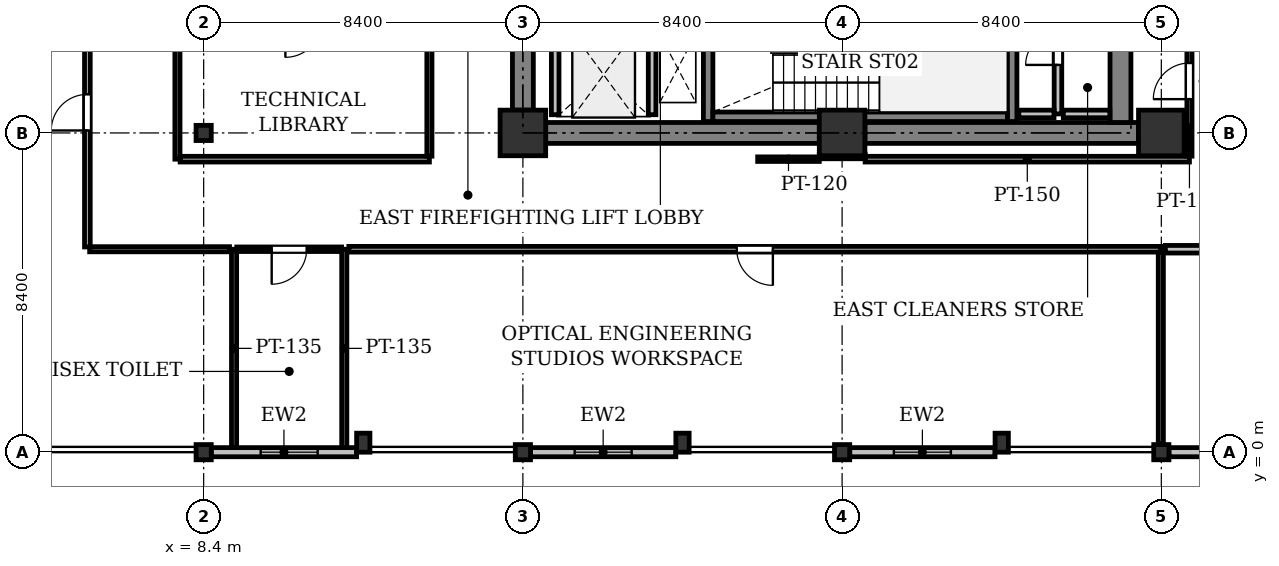
"""IFC4 building model, lengths in metres.
Left out: names, types, materials, properties, quantities, classifications, styles, units other than length and angle.
Written with IfcOpenShell. Run it as: python <this file> out.ifc"""

import sys

from ifc_helpers import new_model, si_unit, direction, frame, frame_2d, origin, origin_2d, place, context, subcontext, project, spatial, rectangle, i_section, extrude, element, fill, save


model = new_model("IFC4")
c1 = context("Model", 3, precision=1e-05, world=origin(), true_north=direction((0.0, 1.0)))
c2 = subcontext(c1, "Body", "Model", "MODEL_VIEW")
j1 = project(units=[si_unit("LENGTHUNIT", "METRE"), si_unit("PLANEANGLEUNIT", "RADIAN")], contexts=[c1])
p1 = place(None, origin())
s1 = spatial("IfcSite", under=j1, at=p1, CompositionType="ELEMENT")
p2 = place(p1, origin())
s2 = spatial("IfcBuilding", under=s1, at=p2, CompositionType="ELEMENT")
p3 = place(p2, frame((0.0, 0.0, 96.7)))
s3 = spatial("IfcBuildingStorey", under=s2, at=p3, CompositionType="ELEMENT", Elevation=96.7)
for number, where, z_axis, x_axis in (
    (1, (8.4, 0.0, 0.0), (0.0, 0.0, 1.0), (1.0, 0.0, 0.0)),
    (2, (8.4, 8.4, 0.0), (0.0, 0.0, 1.0), (1.0, 0.0, 0.0)),
    (3, (16.8, 0.0, 0.0), (0.0, 0.0, 1.0), (1.0, 0.0, 0.0)),
):
    element("IfcColumn", number, at=place(p3, frame(where, z_axis=z_axis, x_axis=x_axis)), inside=s3, PredefinedType="COLUMN", context=c2, shape_type="SweptSolid", body=[
        extrude(i_section(OverallWidth=0.4, OverallDepth=0.4, WebThickness=0.025, FlangeThickness=0.04, at=origin_2d()), origin(), (0.0, 0.0, 1.0), 4.1),
    ])
p4 = place(p3, frame((16.8, 8.4, 0.0), z_axis=(0.0, 0.0, 1.0), x_axis=(1.0, 0.0, 0.0)))
e4 = element("IfcColumn", 4, at=p4, inside=s3, PredefinedType="COLUMN", context=c2, shape_type="SweptSolid", body=[
    extrude(rectangle(XDim=1.2, YDim=1.2, at=origin_2d()), origin(), (0.0, 0.0, 1.0), 4.1),
])
p5 = place(p3, frame((25.2, 0.0, 0.0), z_axis=(0.0, 0.0, 1.0), x_axis=(1.0, 0.0, 0.0)))
e5 = element("IfcColumn", 5, at=p5, inside=s3, PredefinedType="COLUMN", context=c2, shape_type="SweptSolid", body=[
    extrude(i_section(OverallWidth=0.4, OverallDepth=0.4, WebThickness=0.025, FlangeThickness=0.04, at=origin_2d()), origin(), (0.0, 0.0, 1.0), 4.1),
])
p6 = place(p3, frame((25.2, 8.4, 0.0), z_axis=(0.0, 0.0, 1.0), x_axis=(1.0, 0.0, 0.0)))
e6 = element("IfcColumn", 6, at=p6, inside=s3, PredefinedType="COLUMN", context=c2, shape_type="SweptSolid", body=[
    extrude(rectangle(XDim=1.2, YDim=1.2, at=origin_2d()), origin(), (0.0, 0.0, 1.0), 4.1),
])
p7 = place(p3, frame((33.6, 0.0, 0.0), z_axis=(0.0, 0.0, 1.0), x_axis=(1.0, 0.0, 0.0)))
e7 = element("IfcColumn", 7, at=p7, inside=s3, PredefinedType="COLUMN", context=c2, shape_type="SweptSolid", body=[
    extrude(i_section(OverallWidth=0.4, OverallDepth=0.4, WebThickness=0.025, FlangeThickness=0.04, at=origin_2d()), origin(), (0.0, 0.0, 1.0), 4.1),
])
p8 = place(p3, frame((33.6, 8.4, 0.0), z_axis=(0.0, 0.0, 1.0), x_axis=(1.0, 0.0, 0.0)))
e8 = element("IfcColumn", 8, at=p8, inside=s3, PredefinedType="COLUMN", context=c2, shape_type="SweptSolid", body=[
    extrude(rectangle(XDim=1.2, YDim=1.2, at=origin_2d()), origin(), (0.0, 0.0, 1.0), 4.1),
])
for number, where, z_axis, x_axis in (
    (9, (12.6, 0.25, 0.0), (0.0, 0.0, 1.0), (1.0, 0.0, 0.0)),
    (10, (21.0, 0.25, 0.0), (0.0, 0.0, 1.0), (1.0, 0.0, 0.0)),
    (11, (29.4, 0.25, 0.0), (0.0, 0.0, 1.0), (1.0, 0.0, 0.0)),
):
    element("IfcColumn", number, at=place(p3, frame(where, z_axis=z_axis, x_axis=x_axis)), inside=s3, PredefinedType="PILASTER", context=c2, shape_type="SweptSolid", body=[
        extrude(rectangle(XDim=0.35, YDim=0.5, at=origin_2d()), origin(), (0.0, 0.0, 1.0), 4.1),
    ])
p9 = place(p3, frame((41.8, 0.0, 0.0), z_axis=(0.0, 0.0, 1.0), x_axis=(-1.0, 0.0, 0.0)))
e12 = element("IfcWall", 12, at=p9, inside=s3, PredefinedType="STANDARD", context=c2, shape_type="SweptSolid", body=[
    extrude(rectangle(XDim=8.0, YDim=0.24, at=frame_2d((4.0, 0.0))), origin(), (0.0, 0.0, 1.0), 3.422),
])
p10 = place(p9, frame((3.25, 0.0, 0.9)))
e13 = element("IfcOpeningElement", 13, at=p10, cuts=e12, PredefinedType="OPENING", context=c2, shape_type="SweptSolid", body=[
    extrude(rectangle(XDim=1.5, YDim=1.6, at=frame_2d((0.75, 0.8))), frame((0.0, 0.13, 0.0), z_axis=(0.0, -1.0, 0.0), x_axis=(1.0, 0.0, 0.0)), (0.0, 0.0, 1.0), 0.26),
])
p11 = place(p3, frame((29.225, 0.0, 0.0), z_axis=(0.0, 0.0, 1.0), x_axis=(-1.0, 0.0, 0.0)))
e14 = element("IfcWall", 14, at=p11, inside=s3, PredefinedType="STANDARD", context=c2, shape_type="SweptSolid", body=[
    extrude(rectangle(XDim=3.825, YDim=0.24, at=frame_2d((1.913, 0.0))), origin(), (0.0, 0.0, 1.0), 3.422),
])
p12 = place(p11, frame((1.163, 0.0, 0.9)))
e15 = element("IfcOpeningElement", 15, at=p12, cuts=e14, PredefinedType="OPENING", context=c2, shape_type="SweptSolid", body=[
    extrude(rectangle(XDim=1.5, YDim=1.6, at=frame_2d((0.75, 0.8))), frame((0.0, 0.13, 0.0), z_axis=(0.0, -1.0, 0.0), x_axis=(1.0, 0.0, 0.0)), (0.0, 0.0, 1.0), 0.26),
])
p13 = place(p3, frame((20.825, 0.0, 0.0), z_axis=(0.0, 0.0, 1.0), x_axis=(-1.0, 0.0, 0.0)))
e16 = element("IfcWall", 16, at=p13, inside=s3, PredefinedType="STANDARD", context=c2, shape_type="SweptSolid", body=[
    extrude(rectangle(XDim=3.825, YDim=0.24, at=frame_2d((1.913, 0.0))), origin(), (0.0, 0.0, 1.0), 3.422),
])
p14 = place(p13, frame((1.163, 0.0, 0.9)))
e17 = element("IfcOpeningElement", 17, at=p14, cuts=e16, PredefinedType="OPENING", context=c2, shape_type="SweptSolid", body=[
    extrude(rectangle(XDim=1.5, YDim=1.6, at=frame_2d((0.75, 0.8))), frame((0.0, 0.13, 0.0), z_axis=(0.0, -1.0, 0.0), x_axis=(1.0, 0.0, 0.0)), (0.0, 0.0, 1.0), 0.26),
])
p15 = place(p3, frame((12.425, 0.0, 0.0), z_axis=(0.0, 0.0, 1.0), x_axis=(-1.0, 0.0, 0.0)))
e18 = element("IfcWall", 18, at=p15, inside=s3, PredefinedType="STANDARD", context=c2, shape_type="SweptSolid", body=[
    extrude(rectangle(XDim=3.825, YDim=0.24, at=frame_2d((1.913, 0.0))), origin(), (0.0, 0.0, 1.0), 3.422),
])
p16 = place(p15, frame((1.025, 0.0, 0.9)))
e19 = element("IfcOpeningElement", 19, at=p16, cuts=e18, PredefinedType="OPENING", context=c2, shape_type="SweptSolid", body=[
    extrude(rectangle(XDim=1.5, YDim=1.6, at=frame_2d((0.75, 0.8))), frame((0.0, 0.13, 0.0), z_axis=(0.0, -1.0, 0.0), x_axis=(1.0, 0.0, 0.0)), (0.0, 0.0, 1.0), 0.26),
])
p17 = place(p3, frame((17.4, 8.4, 0.0), z_axis=(0.0, 0.0, 1.0), x_axis=(1.0, 0.0, 0.0)))
e20 = element("IfcWall", 20, at=p17, inside=s3, PredefinedType="SHEAR", context=c2, shape_type="SweptSolid", body=[
    extrude(rectangle(XDim=7.2, YDim=0.55, at=frame_2d((3.6, 0.0))), origin(), (0.0, 0.0, 1.0), 3.825),
])
p18 = place(p3, frame((25.8, 8.4, 0.0), z_axis=(0.0, 0.0, 1.0), x_axis=(1.0, 0.0, 0.0)))
e21 = element("IfcWall", 21, at=p18, inside=s3, PredefinedType="SHEAR", context=c2, shape_type="SweptSolid", body=[
    extrude(rectangle(XDim=7.2, YDim=0.55, at=frame_2d((3.6, 0.0))), origin(), (0.0, 0.0, 1.0), 3.825),
])
p19 = place(p3, frame((32.525, 8.675, 0.0), z_axis=(0.0, 0.0, 1.0), x_axis=(0.0, 1.0, 0.0)))
e22 = element("IfcWall", 22, at=p19, inside=s3, PredefinedType="SHEAR", context=c2, shape_type="SweptSolid", body=[
    extrude(rectangle(XDim=7.85, YDim=0.55, at=frame_2d((3.925, 0.0))), origin(), (0.0, 0.0, 1.0), 3.825),
])
p20 = place(p19, frame((4.025, 0.0, 0.0)))
e23 = element("IfcOpeningElement", 23, at=p20, cuts=e22, PredefinedType="OPENING", context=c2, shape_type="SweptSolid", body=[
    extrude(rectangle(XDim=1.1, YDim=2.15, at=frame_2d((0.55, 1.075))), frame((0.0, 0.285, 0.0), z_axis=(0.0, -1.0, 0.0), x_axis=(1.0, 0.0, 0.0)), (0.0, 0.0, 1.0), 0.57),
])
p21 = place(p3, frame((16.8, 9.0, 0.0), z_axis=(0.0, 0.0, 1.0), x_axis=(0.0, 1.0, 0.0)))
e24 = element("IfcWall", 24, at=p21, inside=s3, PredefinedType="SHEAR", context=c2, shape_type="SweptSolid", body=[
    extrude(rectangle(XDim=7.2, YDim=0.55, at=frame_2d((3.6, 0.0))), origin(), (0.0, 0.0, 1.0), 3.825),
])
p22 = place(p21, frame((3.25, 0.0, 0.0)))
e25 = element("IfcOpeningElement", 25, at=p22, cuts=e24, PredefinedType="OPENING", context=c2, shape_type="SweptSolid", body=[
    extrude(rectangle(XDim=1.1, YDim=2.15, at=frame_2d((0.55, 1.075))), frame((0.0, 0.285, 0.0), z_axis=(0.0, -1.0, 0.0), x_axis=(1.0, 0.0, 0.0)), (0.0, 0.0, 1.0), 0.57),
])
for number, where, z_axis, x_axis in (
    (26, (21.675, 8.7, 0.0), (0.0, 0.0, 1.0), (0.0, 1.0, 0.0)),
    (27, (29.675, 8.7, 0.0), (0.0, 0.0, 1.0), (0.0, 1.0, 0.0)),
):
    element("IfcWall", number, at=place(p3, frame(where, z_axis=z_axis, x_axis=x_axis)), inside=s3, PredefinedType="SHEAR", context=c2, shape_type="SweptSolid", body=[
        extrude(rectangle(XDim=3.75, YDim=0.25, at=frame_2d((1.875, 0.0))), origin(), (0.0, 0.0, 1.0), 3.825),
    ])
p23 = place(p3, frame((21.8, 8.825, 0.0), z_axis=(0.0, 0.0, 1.0), x_axis=(1.0, 0.0, 0.0)))
e28 = element("IfcWall", 28, at=p23, inside=s3, PredefinedType="SHEAR", context=c2, shape_type="SweptSolid", body=[
    extrude(rectangle(XDim=7.75, YDim=0.25, at=frame_2d((3.875, 0.0))), origin(), (0.0, 0.0, 1.0), 3.825),
])
for number, where, z_axis, x_axis in (
    (29, (20.2, 8.88, 0.0), (0.0, 0.0, 1.0), (0.0, 1.0, 0.0)),
    (30, (17.65, 8.88, 0.0), (0.0, 0.0, 1.0), (0.0, 1.0, 0.0)),
):
    element("IfcWall", number, at=place(p3, frame(where, z_axis=z_axis, x_axis=x_axis)), inside=s3, PredefinedType="PARTITIONING", context=c2, shape_type="SweptSolid", body=[
        extrude(rectangle(XDim=2.1, YDim=0.2, at=frame_2d((1.05, 0.0))), origin(), (0.0, 0.0, 1.0), 3.825),
    ])
p24 = place(p3, frame((30.88, 8.9, 0.0), z_axis=(0.0, 0.0, 1.0), x_axis=(0.0, 1.0, 0.0)))
e31 = element("IfcWall", 31, at=p24, inside=s3, PredefinedType="PARTITIONING", context=c2, shape_type="SweptSolid", body=[
    extrude(rectangle(XDim=3.43, YDim=0.2, at=frame_2d((1.715, 0.0))), origin(), (0.0, 0.0, 1.0), 3.825),
])
p25 = place(p24, frame((1.29, 0.0, 0.0)))
e32 = element("IfcOpeningElement", 32, at=p25, cuts=e31, PredefinedType="OPENING", context=c2, shape_type="SweptSolid", body=[
    extrude(rectangle(XDim=0.85, YDim=2.15, at=frame_2d((0.425, 1.075))), frame((0.0, 0.11, 0.0), z_axis=(0.0, -1.0, 0.0), x_axis=(1.0, 0.0, 0.0)), (0.0, 0.0, 1.0), 0.22),
])
p26 = place(p3, frame((29.85, 8.9, 0.0), z_axis=(0.0, 0.0, 1.0), x_axis=(1.0, 0.0, 0.0)))
e33 = element("IfcWall", 33, at=p26, inside=s3, PredefinedType="PARTITIONING", context=c2, shape_type="SweptSolid", body=[
    extrude(rectangle(XDim=0.926, YDim=0.2, at=frame_2d((0.463, 0.0))), origin(), (0.0, 0.0, 1.0), 3.825),
])
p27 = place(p3, frame((31.02, 8.9, 0.0), z_axis=(0.0, 0.0, 1.0), x_axis=(1.0, 0.0, 0.0)))
e34 = element("IfcWall", 34, at=p27, inside=s3, PredefinedType="PARTITIONING", context=c2, shape_type="SweptSolid", body=[
    extrude(rectangle(XDim=1.226, YDim=0.2, at=frame_2d((0.613, 0.0))), origin(), (0.0, 0.0, 1.0), 3.825),
])
for number, where, z_axis, x_axis in (
    (35, (9.2, 5.34, 0.0), (0.0, 0.0, 1.0), (0.0, -1.0, 0.0)),
    (36, (12.1, 0.124, 0.0), (0.0, 0.0, 1.0), (0.0, 1.0, 0.0)),
):
    element("IfcWall", number, at=place(p3, frame(where, z_axis=z_axis, x_axis=x_axis)), inside=s3, PredefinedType="PARTITIONING", context=c2, shape_type="SweptSolid", body=[
        extrude(rectangle(XDim=5.216, YDim=0.135, at=frame_2d((2.608, 0.0))), origin(), (0.0, 0.0, 1.0), 3.825),
    ])
p28 = place(p3, frame((12.029, 5.34, 0.0), z_axis=(0.0, 0.0, 1.0), x_axis=(-1.0, 0.0, 0.0)))
e37 = element("IfcWall", 37, at=p28, inside=s3, PredefinedType="PARTITIONING", context=c2, shape_type="SweptSolid", body=[
    extrude(rectangle(XDim=2.757, YDim=0.12, at=frame_2d((1.378, 0.0))), origin(), (0.0, 0.0, 1.0), 3.825),
])
p29 = place(p28, frame((0.918, 0.0, 0.0)))
e38 = element("IfcOpeningElement", 38, at=p29, cuts=e37, PredefinedType="OPENING", context=c2, shape_type="SweptSolid", body=[
    extrude(rectangle(XDim=0.92, YDim=2.1, at=frame_2d((0.46, 1.05))), frame((0.0, 0.07, 0.0), z_axis=(0.0, -1.0, 0.0), x_axis=(1.0, 0.0, 0.0)), (0.0, 0.0, 1.0), 0.14),
])
p30 = place(p3, frame((25.806, 7.781, 0.0), z_axis=(0.0, 0.0, 1.0), x_axis=(-0.999999672047, -0.000809880277, 0.0)))
e39 = element("IfcWall", 39, at=p30, inside=s3, PredefinedType="PARTITIONING", context=c2, shape_type="SweptSolid", body=[
    extrude(rectangle(XDim=1.206, YDim=0.12, at=frame_2d((0.603, 0.0))), origin(), (0.0, 0.0, 1.0), 3.297),
])
p31 = place(p3, frame((22.978, 7.71, 0.0), z_axis=(0.0, 0.0, 1.0), x_axis=(1.0, 0.0, 0.0)))
e40 = element("IfcWall", 40, at=p31, inside=s3, PredefinedType="PARTITIONING", context=c2, shape_type="SweptSolid", body=[
    extrude(rectangle(XDim=1.622, YDim=0.12, at=frame_2d((0.811, 0.0))), origin(), (0.0, 0.0, 1.0), 3.825),
])
p32 = place(p3, frame((25.806, 7.71, 0.0), z_axis=(0.0, 0.0, 1.0), x_axis=(1.0, 0.0, 0.0)))
e41 = element("IfcWall", 41, at=p32, inside=s3, PredefinedType="PARTITIONING", context=c2, shape_type="SweptSolid", body=[
    extrude(rectangle(XDim=8.534, YDim=0.15, at=frame_2d((4.267, 0.0))), origin(), (0.0, 0.0, 1.0), 3.297),
])
p33 = place(p3, frame((34.34, 7.789, 0.0), z_axis=(0.0, 0.0, 1.0), x_axis=(0.0, 1.0, 0.0)))
e42 = element("IfcWall", 42, at=p33, inside=s3, PredefinedType="PARTITIONING", context=c2, shape_type="SweptSolid", body=[
    extrude(rectangle(XDim=3.951, YDim=0.135, at=frame_2d((1.976, 0.0))), origin(), (0.0, 0.0, 1.0), 3.292),
])
p34 = place(p33, frame((1.5, 0.0, 0.0)))
e43 = element("IfcOpeningElement", 43, at=p34, cuts=e42, PredefinedType="OPENING", context=c2, shape_type="SweptSolid", body=[
    extrude(rectangle(XDim=0.95, YDim=2.15, at=frame_2d((0.475, 1.075))), frame((0.0, 0.077, 0.0), z_axis=(0.0, -1.0, 0.0), x_axis=(1.0, 0.0, 0.0)), (0.0, 0.0, 1.0), 0.155),
])
p35 = place(p3, frame((7.71, 11.261, 0.0), z_axis=(0.0, 0.0, 1.0), x_axis=(0.0, -1.0, 0.0)))
e44 = element("IfcWall", 44, at=p35, inside=s3, PredefinedType="PARTITIONING", context=c2, shape_type="SweptSolid", body=[
    extrude(rectangle(XDim=3.551, YDim=0.135, at=frame_2d((1.775, 0.0))), origin(), (0.0, 0.0, 1.0), 3.292),
])
p36 = place(p3, frame((7.781, 7.71, 0.0), z_axis=(0.0, 0.0, 1.0), x_axis=(1.0, 0.0, 0.0)))
e45 = element("IfcWall", 45, at=p36, inside=s3, PredefinedType="PARTITIONING", context=c2, shape_type="SweptSolid", body=[
    extrude(rectangle(XDim=6.559, YDim=0.15, at=frame_2d((3.279, 0.0))), origin(), (0.0, 0.0, 1.0), 3.297),
])
p37 = place(p3, frame((14.34, 7.789, 0.0), z_axis=(0.0, 0.0, 1.0), x_axis=(0.0, 1.0, 0.0)))
e46 = element("IfcWall", 46, at=p37, inside=s3, PredefinedType="PARTITIONING", context=c2, shape_type="SweptSolid", body=[
    extrude(rectangle(XDim=3.472, YDim=0.135, at=frame_2d((1.736, 0.0))), origin(), (0.0, 0.0, 1.0), 3.292),
])
p38 = place(p3, frame((9.08, 5.34, 0.0), z_axis=(0.0, 0.0, 1.0), x_axis=(-1.0, 0.0, 0.0)))
e47 = element("IfcWall", 47, at=p38, inside=s3, PredefinedType="PARTITIONING", context=c2, shape_type="SweptSolid", body=[
    extrude(rectangle(XDim=3.68, YDim=0.135, at=frame_2d((1.84, 0.0))), origin(), (0.0, 0.0, 1.0), 3.297),
])
p39 = place(p3, frame((5.34, 5.4, 0.0), z_axis=(0.0, 0.0, 1.0), x_axis=(0.0, 1.0, 0.0)))
e48 = element("IfcWall", 48, at=p39, inside=s3, PredefinedType="PARTITIONING", context=c2, shape_type="SweptSolid", body=[
    extrude(rectangle(XDim=7.08, YDim=0.15, at=frame_2d((3.54, 0.0))), origin(), (0.0, 0.0, 1.0), 3.292),
])
p40 = place(p39, frame((3.065, 0.0, 0.0)))
e49 = element("IfcOpeningElement", 49, at=p40, cuts=e48, PredefinedType="OPENING", context=c2, shape_type="SweptSolid", body=[
    extrude(rectangle(XDim=0.95, YDim=2.15, at=frame_2d((0.475, 1.075))), frame((0.0, 0.085, 0.0), z_axis=(0.0, -1.0, 0.0), x_axis=(1.0, 0.0, 0.0)), (0.0, 0.0, 1.0), 0.17),
])
p41 = place(p3, frame((33.587, 5.34, 0.0), z_axis=(0.0, 0.0, 1.0), x_axis=(-1.0, 0.0, 0.0)))
e50 = element("IfcWall", 50, at=p41, inside=s3, PredefinedType="PARTITIONING", context=c2, shape_type="SweptSolid", body=[
    extrude(rectangle(XDim=21.367, YDim=0.15, at=frame_2d((10.683, 0.0))), origin(), (0.0, 0.0, 1.0), 3.297),
])
p42 = place(p41, frame((10.208, 0.0, 0.0)))
e51 = element("IfcOpeningElement", 51, at=p42, cuts=e50, PredefinedType="OPENING", context=c2, shape_type="SweptSolid", body=[
    extrude(rectangle(XDim=0.95, YDim=2.15, at=frame_2d((0.475, 1.075))), frame((0.0, 0.085, 0.0), z_axis=(0.0, -1.0, 0.0), x_axis=(1.0, 0.0, 0.0)), (0.0, 0.0, 1.0), 0.17),
])
p43 = place(p3, frame((33.587, 0.22, 0.0), z_axis=(0.0, 0.0, 1.0), x_axis=(0.0, 1.0, 0.0)))
e52 = element("IfcWall", 52, at=p43, inside=s3, PredefinedType="PARTITIONING", context=c2, shape_type="SweptSolid", body=[
    extrude(rectangle(XDim=5.041, YDim=0.135, at=frame_2d((2.521, 0.0))), origin(), (0.0, 0.0, 1.0), 3.297),
])
p44 = place(p3, frame((43.2, 5.34, 0.0), z_axis=(0.0, 0.0, 1.0), x_axis=(-1.0, 0.0, 0.0)))
e53 = element("IfcWall", 53, at=p44, inside=s3, PredefinedType="PARTITIONING", context=c2, shape_type="SweptSolid", body=[
    extrude(rectangle(XDim=9.493, YDim=0.2, at=frame_2d((4.747, 0.0))), origin(), (0.0, 0.0, 1.0), 3.297),
])
p45 = place(p12, origin())
e54 = element("IfcWindow", 54, at=p45, inside=s3, PartitioningType="SINGLE_PANEL", PredefinedType="WINDOW", context=c2, shape_type="SweptSolid", body=[
    extrude(rectangle(XDim=1.5, YDim=1.6, at=frame_2d((0.75, 0.8))), frame((0.0, 0.03, 0.0), z_axis=(0.0, -1.0, 0.0), x_axis=(1.0, 0.0, 0.0)), (0.0, 0.0, 1.0), 0.06),
])
fill(e15, e54)
p46 = place(p14, origin())
e55 = element("IfcWindow", 55, at=p46, inside=s3, PartitioningType="SINGLE_PANEL", PredefinedType="WINDOW", context=c2, shape_type="SweptSolid", body=[
    extrude(rectangle(XDim=1.5, YDim=1.6, at=frame_2d((0.75, 0.8))), frame((0.0, 0.03, 0.0), z_axis=(0.0, -1.0, 0.0), x_axis=(1.0, 0.0, 0.0)), (0.0, 0.0, 1.0), 0.06),
])
fill(e17, e55)
p47 = place(p16, origin())
e56 = element("IfcWindow", 56, at=p47, inside=s3, PartitioningType="SINGLE_PANEL", PredefinedType="WINDOW", context=c2, shape_type="SweptSolid", body=[
    extrude(rectangle(XDim=1.5, YDim=1.6, at=frame_2d((0.75, 0.8))), frame((0.0, 0.03, 0.0), z_axis=(0.0, -1.0, 0.0), x_axis=(1.0, 0.0, 0.0)), (0.0, 0.0, 1.0), 0.06),
])
fill(e19, e56)
p48 = place(p25, origin())
e57 = element("IfcDoor", 57, at=p48, inside=s3, OperationType="SINGLE_SWING_LEFT", PredefinedType="DOOR", context=c2, shape_type="SweptSolid", body=[
    extrude(rectangle(XDim=0.85, YDim=2.15, at=frame_2d((0.425, 1.075))), frame((0.0, 0.025, 0.0), z_axis=(0.0, -1.0, 0.0), x_axis=(1.0, 0.0, 0.0)), (0.0, 0.0, 1.0), 0.05),
])
fill(e32, e57)
p49 = place(p29, origin())
e58 = element("IfcDoor", 58, at=p49, inside=s3, OperationType="SINGLE_SWING_RIGHT", PredefinedType="DOOR", context=c2, shape_type="SweptSolid", body=[
    extrude(rectangle(XDim=0.92, YDim=2.1, at=frame_2d((0.46, 1.05))), frame((0.0, 0.025, 0.0), z_axis=(0.0, -1.0, 0.0), x_axis=(1.0, 0.0, 0.0)), (0.0, 0.0, 1.0), 0.05),
])
fill(e38, e58)
p50 = place(p34, origin())
e59 = element("IfcDoor", 59, at=p50, inside=s3, OperationType="SINGLE_SWING_LEFT", PredefinedType="DOOR", context=c2, shape_type="SweptSolid", body=[
    extrude(rectangle(XDim=0.95, YDim=2.15, at=frame_2d((0.475, 1.075))), frame((0.0, 0.025, 0.0), z_axis=(0.0, -1.0, 0.0), x_axis=(1.0, 0.0, 0.0)), (0.0, 0.0, 1.0), 0.05),
])
fill(e43, e59)
p51 = place(p40, origin())
e60 = element("IfcDoor", 60, at=p51, inside=s3, OperationType="SINGLE_SWING_LEFT", PredefinedType="DOOR", context=c2, shape_type="SweptSolid", body=[
    extrude(rectangle(XDim=0.95, YDim=2.15, at=frame_2d((0.475, 1.075))), frame((0.0, 0.025, 0.0), z_axis=(0.0, -1.0, 0.0), x_axis=(1.0, 0.0, 0.0)), (0.0, 0.0, 1.0), 0.05),
])
fill(e49, e60)
p52 = place(p42, origin())
e61 = element("IfcDoor", 61, at=p52, inside=s3, OperationType="SINGLE_SWING_LEFT", PredefinedType="DOOR", context=c2, shape_type="SweptSolid", body=[
    extrude(rectangle(XDim=0.95, YDim=2.15, at=frame_2d((0.475, 1.075))), frame((0.0, 0.025, 0.0), z_axis=(0.0, -1.0, 0.0), x_axis=(1.0, 0.0, 0.0)), (0.0, 0.0, 1.0), 0.05),
])
fill(e51, e61)
save(model, sys.argv[1])
